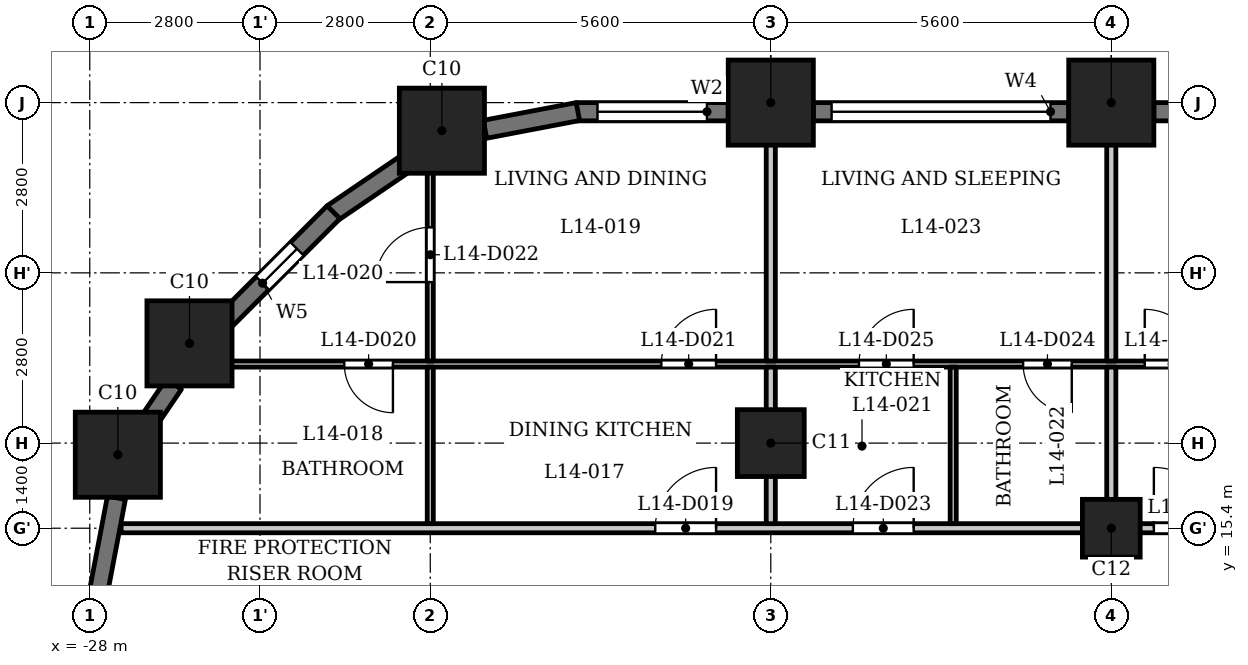
"""IFC4 building model, lengths in metres.
Left out: names, types, materials, properties, quantities, classifications, styles, units other than length and angle.
Written with IfcOpenShell. Run it as: python <this file> out.ifc"""

import sys

from ifc_helpers import new_model, si_unit, direction, frame, frame_2d, origin, origin_2d, place, context, subcontext, project, spatial, rectangle, extrude, element, fill, save


model = new_model("IFC4")
c1 = context("Model", 3, precision=1e-05, world=origin(), true_north=direction((0.0, 1.0)))
c2 = subcontext(c1, "Body", "Model", "MODEL_VIEW")
j1 = project(units=[si_unit("LENGTHUNIT", "METRE"), si_unit("PLANEANGLEUNIT", "RADIAN")], contexts=[c1])
p1 = place(None, origin())
s1 = spatial("IfcSite", under=j1, at=p1, CompositionType="ELEMENT")
p2 = place(p1, origin())
s2 = spatial("IfcBuilding", under=s1, at=p2, CompositionType="ELEMENT")
p3 = place(p2, frame((0.0, 0.0, 58.5)))
s3 = spatial("IfcBuildingStorey", under=s2, at=p3, CompositionType="ELEMENT", Elevation=58.5)
for number, where, z_axis, x_axis in (
    (1, (-11.2, 22.4, 0.0), (0.0, 0.0, 1.0), (1.0, 0.0, 0.0)),
    (2, (-16.8, 22.4, 0.0), (0.0, 0.0, 1.0), (1.0, 0.0, 0.0)),
    (3, (-22.209, 21.938, 0.0), (0.0, 0.0, 1.0), (1.0, 0.0, 0.0)),
    (4, (-26.36, 18.44, 0.0), (0.0, 0.0, 1.0), (1.0, 0.0, 0.0)),
    (5, (-27.538, 16.609, 0.0), (0.0, 0.0, 1.0), (1.0, 0.0, 0.0)),
):
    element("IfcColumn", number, at=place(p3, frame(where, z_axis=z_axis, x_axis=x_axis)), inside=s3, PredefinedType="COLUMN", context=c2, shape_type="SweptSolid", body=[
        extrude(rectangle(XDim=1.4, YDim=1.4, at=origin_2d()), origin(), (0.0, 0.0, 1.0), 3.5),
    ])
p4 = place(p3, frame((-16.8, 16.8, 0.0), z_axis=(0.0, 0.0, 1.0), x_axis=(1.0, 0.0, 0.0)))
e6 = element("IfcColumn", 6, at=p4, inside=s3, PredefinedType="COLUMN", context=c2, shape_type="SweptSolid", body=[
    extrude(rectangle(XDim=1.1, YDim=1.1, at=origin_2d()), origin(), (0.0, 0.0, 1.0), 3.5),
])
p5 = place(p3, frame((-11.2, 15.4, 0.0), z_axis=(0.0, 0.0, 1.0), x_axis=(1.0, 0.0, 0.0)))
e7 = element("IfcColumn", 7, at=p5, inside=s3, PredefinedType="COLUMN", context=c2, shape_type="SweptSolid", body=[
    extrude(rectangle(XDim=0.95, YDim=0.95, at=origin_2d()), origin(), (0.0, 0.0, 1.0), 3.5),
])
p6 = place(p3, frame((-6.3, 22.25, 0.0), z_axis=(0.0, 0.0, 1.0), x_axis=(-1.0, 0.0, 0.0)))
e8 = element("IfcWall", 8, at=p6, inside=s3, PredefinedType="SOLIDWALL", context=c2, shape_type="SweptSolid", body=[
    extrude(rectangle(XDim=4.2, YDim=0.3, at=frame_2d((2.1, 0.0))), origin(), (0.0, 0.0, 1.0), 2.35),
])
p7 = place(p6, frame((0.3, 0.0, 1.2)))
e9 = element("IfcOpeningElement", 9, at=p7, cuts=e8, PredefinedType="OPENING", context=c2, shape_type="SweptSolid", body=[
    extrude(rectangle(XDim=3.6, YDim=0.95, at=frame_2d((1.8, 0.475))), frame((0.0, 0.16, 0.0), z_axis=(0.0, -1.0, 0.0), x_axis=(1.0, 0.0, 0.0)), (0.0, 0.0, 1.0), 0.32),
])
p8 = place(p3, frame((-11.9, 22.25, 0.0), z_axis=(0.0, 0.0, 1.0), x_axis=(-1.0, 0.0, 0.0)))
e10 = element("IfcWall", 10, at=p8, inside=s3, PredefinedType="SOLIDWALL", context=c2, shape_type="SweptSolid", body=[
    extrude(rectangle(XDim=4.2, YDim=0.3, at=frame_2d((2.1, 0.0))), origin(), (0.0, 0.0, 1.0), 2.35),
])
p9 = place(p8, frame((0.3, 0.0, 1.2)))
e11 = element("IfcOpeningElement", 11, at=p9, cuts=e10, PredefinedType="OPENING", context=c2, shape_type="SweptSolid", body=[
    extrude(rectangle(XDim=3.6, YDim=0.95, at=frame_2d((1.8, 0.475))), frame((0.0, 0.16, 0.0), z_axis=(0.0, -1.0, 0.0), x_axis=(1.0, 0.0, 0.0)), (0.0, 0.0, 1.0), 0.32),
])
p10 = place(p3, frame((-17.5, 22.25, 0.0), z_axis=(0.0, 0.0, 1.0), x_axis=(-1.0, 0.0, 0.0)))
e12 = element("IfcWall", 12, at=p10, inside=s3, PredefinedType="SOLIDWALL", context=c2, shape_type="SweptSolid", body=[
    extrude(rectangle(XDim=2.5, YDim=0.3, at=frame_2d((1.25, 0.0))), origin(), (0.0, 0.0, 1.0), 2.35),
])
p11 = place(p10, frame((0.35, 0.0, 0.9)))
e13 = element("IfcOpeningElement", 13, at=p11, cuts=e12, PredefinedType="OPENING", context=c2, shape_type="SweptSolid", body=[
    extrude(rectangle(XDim=1.8, YDim=1.25, at=frame_2d((0.9, 0.625))), frame((0.0, 0.16, 0.0), z_axis=(0.0, -1.0, 0.0), x_axis=(1.0, 0.0, 0.0)), (0.0, 0.0, 1.0), 0.32),
])
p12 = place(p3, frame((-19.972, 22.253, 0.0), z_axis=(0.0, 0.0, 1.0), x_axis=(-0.982297345734, -0.187328386968, 0.0)))
e14 = element("IfcWall", 14, at=p12, inside=s3, PredefinedType="SOLIDWALL", context=c2, shape_type="SweptSolid", body=[
    extrude(rectangle(XDim=1.556, YDim=0.3, at=frame_2d((0.778, 0.0))), origin(), (0.0, 0.0, 1.0), 2.35),
])
p13 = place(p3, frame((-22.726, 21.454, 0.0), z_axis=(0.0, 0.0, 1.0), x_axis=(-0.827019875346, -0.562172683241, 0.0)))
e15 = element("IfcWall", 15, at=p13, inside=s3, PredefinedType="SOLIDWALL", context=c2, shape_type="SweptSolid", body=[
    extrude(rectangle(XDim=1.556, YDim=0.3, at=frame_2d((0.778, 0.0))), origin(), (0.0, 0.0, 1.0), 2.35),
])
p14 = place(p3, frame((-23.991, 20.597, 0.0), z_axis=(0.0, 0.0, 1.0), x_axis=(-0.707106781187, -0.707106781187, 0.0)))
e16 = element("IfcWall", 16, at=p14, inside=s3, PredefinedType="SOLIDWALL", context=c2, shape_type="SweptSolid", body=[
    extrude(rectangle(XDim=2.5, YDim=0.3, at=frame_2d((1.25, 0.0))), origin(), (0.0, 0.0, 1.0), 2.35),
])
p15 = place(p14, frame((0.85, 0.0, 0.6)))
e17 = element("IfcOpeningElement", 17, at=p15, cuts=e16, PredefinedType="OPENING", context=c2, shape_type="SweptSolid", body=[
    extrude(rectangle(XDim=0.8, YDim=1.55, at=frame_2d((0.4, 0.775))), frame((0.0, 0.16, 0.0), z_axis=(0.0, -1.0, 0.0), x_axis=(1.0, 0.0, 0.0)), (0.0, 0.0, 1.0), 0.32),
])
p16 = place(p3, frame((-26.617, 17.769, 0.0), z_axis=(0.0, 0.0, 1.0), x_axis=(-0.562000651531, -0.827136788977, 0.0)))
e18 = element("IfcWall", 18, at=p16, inside=s3, PredefinedType="SOLIDWALL", context=c2, shape_type="SweptSolid", body=[
    extrude(rectangle(XDim=0.777, YDim=0.3, at=frame_2d((0.389, 0.0))), origin(), (0.0, 0.0, 1.0), 3.2),
])
p17 = place(p3, frame((-27.561, 15.9, 0.0), z_axis=(0.0, 0.0, 1.0), x_axis=(-0.187328386968, -0.982297345734, 0.0)))
e19 = element("IfcWall", 19, at=p17, inside=s3, PredefinedType="SOLIDWALL", context=c2, shape_type="SweptSolid", body=[
    extrude(rectangle(XDim=1.556, YDim=0.3, at=frame_2d((0.778, 0.0))), origin(), (0.0, 0.0, 1.0), 2.35),
])
p18 = place(p3, frame((-27.484, 15.4, 0.0), z_axis=(0.0, 0.0, 1.0), x_axis=(1.0, 0.0, 0.0)))
e20 = element("IfcWall", 20, at=p18, inside=s3, PredefinedType="PARTITIONING", context=c2, shape_type="SweptSolid", body=[
    extrude(rectangle(XDim=54.968, YDim=0.15, at=frame_2d((27.484, 0.0))), origin(), (0.0, 0.0, 1.0), 3.2),
])
p19 = place(p18, frame((8.784, 0.0, 0.0)))
e21 = element("IfcOpeningElement", 21, at=p19, cuts=e20, PredefinedType="OPENING", context=c2, shape_type="SweptSolid", body=[
    extrude(rectangle(XDim=1.0, YDim=2.1, at=frame_2d((0.5, 1.05))), frame((0.0, 0.085, 0.0), z_axis=(0.0, -1.0, 0.0), x_axis=(1.0, 0.0, 0.0)), (0.0, 0.0, 1.0), 0.17),
])
p20 = place(p18, frame((12.034, 0.0, 0.0)))
e22 = element("IfcOpeningElement", 22, at=p20, cuts=e20, PredefinedType="OPENING", context=c2, shape_type="SweptSolid", body=[
    extrude(rectangle(XDim=1.0, YDim=2.1, at=frame_2d((0.5, 1.05))), frame((0.0, 0.085, 0.0), z_axis=(0.0, -1.0, 0.0), x_axis=(1.0, 0.0, 0.0)), (0.0, 0.0, 1.0), 0.17),
])
p21 = place(p18, frame((16.984, 0.0, 0.0)))
e23 = element("IfcOpeningElement", 23, at=p21, cuts=e20, PredefinedType="OPENING", context=c2, shape_type="SweptSolid", body=[
    extrude(rectangle(XDim=1.0, YDim=2.1, at=frame_2d((0.5, 1.05))), frame((0.0, 0.085, 0.0), z_axis=(0.0, -1.0, 0.0), x_axis=(1.0, 0.0, 0.0)), (0.0, 0.0, 1.0), 0.17),
])
p22 = place(p18, frame((28.184, 0.0, 0.0)))
e24 = element("IfcOpeningElement", 24, at=p22, cuts=e20, PredefinedType="OPENING", context=c2, shape_type="SweptSolid", body=[
    extrude(rectangle(XDim=1.0, YDim=2.1, at=frame_2d((0.5, 1.05))), frame((0.0, 0.085, 0.0), z_axis=(0.0, -1.0, 0.0), x_axis=(1.0, 0.0, 0.0)), (0.0, 0.0, 1.0), 0.17),
])
p23 = place(p18, frame((48.234, 0.0, 0.0)))
e25 = element("IfcOpeningElement", 25, at=p23, cuts=e20, PredefinedType="OPENING", context=c2, shape_type="SweptSolid", body=[
    extrude(rectangle(XDim=1.0, YDim=2.1, at=frame_2d((0.5, 1.05))), frame((0.0, 0.085, 0.0), z_axis=(0.0, -1.0, 0.0), x_axis=(1.0, 0.0, 0.0)), (0.0, 0.0, 1.0), 0.17),
])
p24 = place(p3, frame((-26.44, 18.1, 0.0), z_axis=(0.0, 0.0, 1.0), x_axis=(1.0, 0.0, 0.0)))
e26 = element("IfcWall", 26, at=p24, inside=s3, PredefinedType="PARTITIONING", context=c2, shape_type="SweptSolid", body=[
    extrude(rectangle(XDim=52.63, YDim=0.1, at=frame_2d((26.315, 0.0))), origin(), (0.0, 0.0, 1.0), 3.2),
])
p25 = place(p24, frame((2.626, 0.0, 0.0)))
e27 = element("IfcOpeningElement", 27, at=p25, cuts=e26, PredefinedType="OPENING", context=c2, shape_type="SweptSolid", body=[
    extrude(rectangle(XDim=0.8, YDim=2.1, at=frame_2d((0.4, 1.05))), frame((0.0, 0.06, 0.0), z_axis=(0.0, -1.0, 0.0), x_axis=(1.0, 0.0, 0.0)), (0.0, 0.0, 1.0), 0.12),
])
p26 = place(p24, frame((7.84, 0.0, 0.0)))
e28 = element("IfcOpeningElement", 28, at=p26, cuts=e26, PredefinedType="OPENING", context=c2, shape_type="SweptSolid", body=[
    extrude(rectangle(XDim=0.9, YDim=2.1, at=frame_2d((0.45, 1.05))), frame((0.0, 0.06, 0.0), z_axis=(0.0, -1.0, 0.0), x_axis=(1.0, 0.0, 0.0)), (0.0, 0.0, 1.0), 0.12),
])
p27 = place(p24, frame((13.79, 0.0, 0.0)))
e29 = element("IfcOpeningElement", 29, at=p27, cuts=e26, PredefinedType="OPENING", context=c2, shape_type="SweptSolid", body=[
    extrude(rectangle(XDim=0.8, YDim=2.1, at=frame_2d((0.4, 1.05))), frame((0.0, 0.06, 0.0), z_axis=(0.0, -1.0, 0.0), x_axis=(1.0, 0.0, 0.0)), (0.0, 0.0, 1.0), 0.12),
])
p28 = place(p24, frame((11.09, 0.0, 0.0)))
e30 = element("IfcOpeningElement", 30, at=p28, cuts=e26, PredefinedType="OPENING", context=c2, shape_type="SweptSolid", body=[
    extrude(rectangle(XDim=0.9, YDim=2.1, at=frame_2d((0.45, 1.05))), frame((0.0, 0.06, 0.0), z_axis=(0.0, -1.0, 0.0), x_axis=(1.0, 0.0, 0.0)), (0.0, 0.0, 1.0), 0.12),
])
p29 = place(p24, frame((21.49, 0.0, 0.0)))
e31 = element("IfcOpeningElement", 31, at=p29, cuts=e26, PredefinedType="OPENING", context=c2, shape_type="SweptSolid", body=[
    extrude(rectangle(XDim=0.8, YDim=2.1, at=frame_2d((0.4, 1.05))), frame((0.0, 0.06, 0.0), z_axis=(0.0, -1.0, 0.0), x_axis=(1.0, 0.0, 0.0)), (0.0, 0.0, 1.0), 0.12),
])
p30 = place(p24, frame((15.79, 0.0, 0.0)))
e32 = element("IfcOpeningElement", 32, at=p30, cuts=e26, PredefinedType="OPENING", context=c2, shape_type="SweptSolid", body=[
    extrude(rectangle(XDim=0.9, YDim=2.1, at=frame_2d((0.45, 1.05))), frame((0.0, 0.06, 0.0), z_axis=(0.0, -1.0, 0.0), x_axis=(1.0, 0.0, 0.0)), (0.0, 0.0, 1.0), 0.12),
])
p31 = place(p24, frame((27.49, 0.0, 0.0)))
e33 = element("IfcOpeningElement", 33, at=p31, cuts=e26, PredefinedType="OPENING", context=c2, shape_type="SweptSolid", body=[
    extrude(rectangle(XDim=0.9, YDim=2.1, at=frame_2d((0.45, 1.05))), frame((0.0, 0.06, 0.0), z_axis=(0.0, -1.0, 0.0), x_axis=(1.0, 0.0, 0.0)), (0.0, 0.0, 1.0), 0.12),
])
p32 = place(p24, frame((29.74, 0.0, 0.0)))
e34 = element("IfcOpeningElement", 34, at=p32, cuts=e26, PredefinedType="OPENING", context=c2, shape_type="SweptSolid", body=[
    extrude(rectangle(XDim=0.9, YDim=2.1, at=frame_2d((0.45, 1.05))), frame((0.0, 0.06, 0.0), z_axis=(0.0, -1.0, 0.0), x_axis=(1.0, 0.0, 0.0)), (0.0, 0.0, 1.0), 0.12),
])
p33 = place(p24, frame((35.84, 0.0, 0.0)))
e35 = element("IfcOpeningElement", 35, at=p33, cuts=e26, PredefinedType="OPENING", context=c2, shape_type="SweptSolid", body=[
    extrude(rectangle(XDim=0.9, YDim=2.1, at=frame_2d((0.45, 1.05))), frame((0.0, 0.06, 0.0), z_axis=(0.0, -1.0, 0.0), x_axis=(1.0, 0.0, 0.0)), (0.0, 0.0, 1.0), 0.12),
])
p34 = place(p24, frame((50.74, 0.0, 0.0)))
e36 = element("IfcOpeningElement", 36, at=p34, cuts=e26, PredefinedType="OPENING", context=c2, shape_type="SweptSolid", body=[
    extrude(rectangle(XDim=0.8, YDim=2.1, at=frame_2d((0.4, 1.05))), frame((0.0, 0.06, 0.0), z_axis=(0.0, -1.0, 0.0), x_axis=(1.0, 0.0, 0.0)), (0.0, 0.0, 1.0), 0.12),
])
p35 = place(p24, frame((47.29, 0.0, 0.0)))
e37 = element("IfcOpeningElement", 37, at=p35, cuts=e26, PredefinedType="OPENING", context=c2, shape_type="SweptSolid", body=[
    extrude(rectangle(XDim=0.9, YDim=2.1, at=frame_2d((0.45, 1.05))), frame((0.0, 0.06, 0.0), z_axis=(0.0, -1.0, 0.0), x_axis=(1.0, 0.0, 0.0)), (0.0, 0.0, 1.0), 0.12),
])
p36 = place(p3, frame((-22.4, 15.475, 0.0), z_axis=(0.0, 0.0, 1.0), x_axis=(0.0, 1.0, 0.0)))
e38 = element("IfcWall", 38, at=p36, inside=s3, PredefinedType="PARTITIONING", context=c2, shape_type="SweptSolid", body=[
    extrude(rectangle(XDim=2.575, YDim=0.1, at=frame_2d((1.288, 0.0))), origin(), (0.0, 0.0, 1.0), 3.2),
])
p37 = place(p3, frame((-22.4, 18.15, 0.0), z_axis=(0.0, 0.0, 1.0), x_axis=(0.0, 1.0, 0.0)))
e39 = element("IfcWall", 39, at=p37, inside=s3, PredefinedType="PARTITIONING", context=c2, shape_type="SweptSolid", body=[
    extrude(rectangle(XDim=3.57, YDim=0.1, at=frame_2d((1.785, 0.0))), origin(), (0.0, 0.0, 1.0), 3.2),
])
p38 = place(p37, frame((1.298, 0.0, 0.0)))
e40 = element("IfcOpeningElement", 40, at=p38, cuts=e39, PredefinedType="OPENING", context=c2, shape_type="SweptSolid", body=[
    extrude(rectangle(XDim=0.9, YDim=2.1, at=frame_2d((0.45, 1.05))), frame((0.0, 0.06, 0.0), z_axis=(0.0, -1.0, 0.0), x_axis=(1.0, 0.0, 0.0)), (0.0, 0.0, 1.0), 0.12),
])
p39 = place(p3, frame((-16.8, 15.475, 0.0), z_axis=(0.0, 0.0, 1.0), x_axis=(0.0, 1.0, 0.0)))
e41 = element("IfcWall", 41, at=p39, inside=s3, PredefinedType="PARTITIONING", context=c2, shape_type="SweptSolid", body=[
    extrude(rectangle(XDim=2.575, YDim=0.15, at=frame_2d((1.288, 0.0))), origin(), (0.0, 0.0, 1.0), 3.2),
])
p40 = place(p3, frame((-16.8, 18.15, 0.0), z_axis=(0.0, 0.0, 1.0), x_axis=(0.0, 1.0, 0.0)))
e42 = element("IfcWall", 42, at=p40, inside=s3, PredefinedType="PARTITIONING", context=c2, shape_type="SweptSolid", body=[
    extrude(rectangle(XDim=4.93, YDim=0.15, at=frame_2d((2.465, 0.0))), origin(), (0.0, 0.0, 1.0), 3.2),
])
p41 = place(p3, frame((-13.8, 15.475, 0.0), z_axis=(0.0, 0.0, 1.0), x_axis=(0.0, 1.0, 0.0)))
e43 = element("IfcWall", 43, at=p41, inside=s3, PredefinedType="PARTITIONING", context=c2, shape_type="SweptSolid", body=[
    extrude(rectangle(XDim=2.575, YDim=0.1, at=frame_2d((1.288, 0.0))), origin(), (0.0, 0.0, 1.0), 3.2),
])
p42 = place(p3, frame((-11.2, 15.475, 0.0), z_axis=(0.0, 0.0, 1.0), x_axis=(0.0, 1.0, 0.0)))
e44 = element("IfcWall", 44, at=p42, inside=s3, PredefinedType="PARTITIONING", context=c2, shape_type="SweptSolid", body=[
    extrude(rectangle(XDim=2.575, YDim=0.15, at=frame_2d((1.288, 0.0))), origin(), (0.0, 0.0, 1.0), 3.2),
])
p43 = place(p3, frame((-11.2, 18.15, 0.0), z_axis=(0.0, 0.0, 1.0), x_axis=(0.0, 1.0, 0.0)))
e45 = element("IfcWall", 45, at=p43, inside=s3, PredefinedType="PARTITIONING", context=c2, shape_type="SweptSolid", body=[
    extrude(rectangle(XDim=4.93, YDim=0.15, at=frame_2d((2.465, 0.0))), origin(), (0.0, 0.0, 1.0), 3.2),
])
p44 = place(p19, origin())
e46 = element("IfcDoor", 46, at=p44, inside=s3, OperationType="SINGLE_SWING_LEFT", PredefinedType="DOOR", context=c2, shape_type="SweptSolid", body=[
    extrude(rectangle(XDim=1.0, YDim=2.1, at=frame_2d((0.5, 1.05))), frame((0.0, 0.025, 0.0), z_axis=(0.0, -1.0, 0.0), x_axis=(1.0, 0.0, 0.0)), (0.0, 0.0, 1.0), 0.05),
])
fill(e21, e46)
p45 = place(p25, origin())
e47 = element("IfcDoor", 47, at=p45, inside=s3, OperationType="SINGLE_SWING_RIGHT", PredefinedType="DOOR", context=c2, shape_type="SweptSolid", body=[
    extrude(rectangle(XDim=0.8, YDim=2.1, at=frame_2d((0.4, 1.05))), frame((0.0, 0.025, 0.0), z_axis=(0.0, -1.0, 0.0), x_axis=(1.0, 0.0, 0.0)), (0.0, 0.0, 1.0), 0.05),
])
fill(e27, e47)
p46 = place(p26, origin())
e48 = element("IfcDoor", 48, at=p46, inside=s3, OperationType="SINGLE_SWING_LEFT", PredefinedType="DOOR", context=c2, shape_type="SweptSolid", body=[
    extrude(rectangle(XDim=0.9, YDim=2.1, at=frame_2d((0.45, 1.05))), frame((0.0, 0.025, 0.0), z_axis=(0.0, -1.0, 0.0), x_axis=(1.0, 0.0, 0.0)), (0.0, 0.0, 1.0), 0.05),
])
fill(e28, e48)
p47 = place(p38, origin())
e49 = element("IfcDoor", 49, at=p47, inside=s3, OperationType="SINGLE_SWING_RIGHT", PredefinedType="DOOR", context=c2, shape_type="SweptSolid", body=[
    extrude(rectangle(XDim=0.9, YDim=2.1, at=frame_2d((0.45, 1.05))), frame((0.0, 0.025, 0.0), z_axis=(0.0, -1.0, 0.0), x_axis=(1.0, 0.0, 0.0)), (0.0, 0.0, 1.0), 0.05),
])
fill(e40, e49)
p48 = place(p20, origin())
e50 = element("IfcDoor", 50, at=p48, inside=s3, OperationType="SINGLE_SWING_LEFT", PredefinedType="DOOR", context=c2, shape_type="SweptSolid", body=[
    extrude(rectangle(XDim=1.0, YDim=2.1, at=frame_2d((0.5, 1.05))), frame((0.0, 0.025, 0.0), z_axis=(0.0, -1.0, 0.0), x_axis=(1.0, 0.0, 0.0)), (0.0, 0.0, 1.0), 0.05),
])
fill(e22, e50)
p49 = place(p27, origin())
e51 = element("IfcDoor", 51, at=p49, inside=s3, OperationType="SINGLE_SWING_RIGHT", PredefinedType="DOOR", context=c2, shape_type="SweptSolid", body=[
    extrude(rectangle(XDim=0.8, YDim=2.1, at=frame_2d((0.4, 1.05))), frame((0.0, 0.025, 0.0), z_axis=(0.0, -1.0, 0.0), x_axis=(1.0, 0.0, 0.0)), (0.0, 0.0, 1.0), 0.05),
])
fill(e29, e51)
p50 = place(p28, origin())
e52 = element("IfcDoor", 52, at=p50, inside=s3, OperationType="SINGLE_SWING_LEFT", PredefinedType="DOOR", context=c2, shape_type="SweptSolid", body=[
    extrude(rectangle(XDim=0.9, YDim=2.1, at=frame_2d((0.45, 1.05))), frame((0.0, 0.025, 0.0), z_axis=(0.0, -1.0, 0.0), x_axis=(1.0, 0.0, 0.0)), (0.0, 0.0, 1.0), 0.05),
])
fill(e30, e52)
p51 = place(p21, origin())
e53 = element("IfcDoor", 53, at=p51, inside=s3, OperationType="SINGLE_SWING_RIGHT", PredefinedType="DOOR", context=c2, shape_type="SweptSolid", body=[
    extrude(rectangle(XDim=1.0, YDim=2.1, at=frame_2d((0.5, 1.05))), frame((0.0, 0.025, 0.0), z_axis=(0.0, -1.0, 0.0), x_axis=(1.0, 0.0, 0.0)), (0.0, 0.0, 1.0), 0.05),
])
fill(e23, e53)
p52 = place(p30, origin())
e54 = element("IfcDoor", 54, at=p52, inside=s3, OperationType="SINGLE_SWING_RIGHT", PredefinedType="DOOR", context=c2, shape_type="SweptSolid", body=[
    extrude(rectangle(XDim=0.9, YDim=2.1, at=frame_2d((0.45, 1.05))), frame((0.0, 0.025, 0.0), z_axis=(0.0, -1.0, 0.0), x_axis=(1.0, 0.0, 0.0)), (0.0, 0.0, 1.0), 0.05),
])
fill(e32, e54)
p53 = place(p9, origin())
e55 = element("IfcWindow", 55, at=p53, inside=s3, PartitioningType="SINGLE_PANEL", PredefinedType="WINDOW", context=c2, shape_type="SweptSolid", body=[
    extrude(rectangle(XDim=3.6, YDim=0.95, at=frame_2d((1.8, 0.475))), frame((0.0, 0.03, 0.0), z_axis=(0.0, -1.0, 0.0), x_axis=(1.0, 0.0, 0.0)), (0.0, 0.0, 1.0), 0.06),
])
fill(e11, e55)
p54 = place(p11, origin())
e56 = element("IfcWindow", 56, at=p54, inside=s3, PartitioningType="SINGLE_PANEL", PredefinedType="WINDOW", context=c2, shape_type="SweptSolid", body=[
    extrude(rectangle(XDim=1.8, YDim=1.25, at=frame_2d((0.9, 0.625))), frame((0.0, 0.03, 0.0), z_axis=(0.0, -1.0, 0.0), x_axis=(1.0, 0.0, 0.0)), (0.0, 0.0, 1.0), 0.06),
])
fill(e13, e56)
p55 = place(p15, origin())
e57 = element("IfcWindow", 57, at=p55, inside=s3, PartitioningType="SINGLE_PANEL", PredefinedType="WINDOW", context=c2, shape_type="SweptSolid", body=[
    extrude(rectangle(XDim=0.8, YDim=1.55, at=frame_2d((0.4, 0.775))), frame((0.0, 0.03, 0.0), z_axis=(0.0, -1.0, 0.0), x_axis=(1.0, 0.0, 0.0)), (0.0, 0.0, 1.0), 0.06),
])
fill(e17, e57)
save(model, sys.argv[1])
